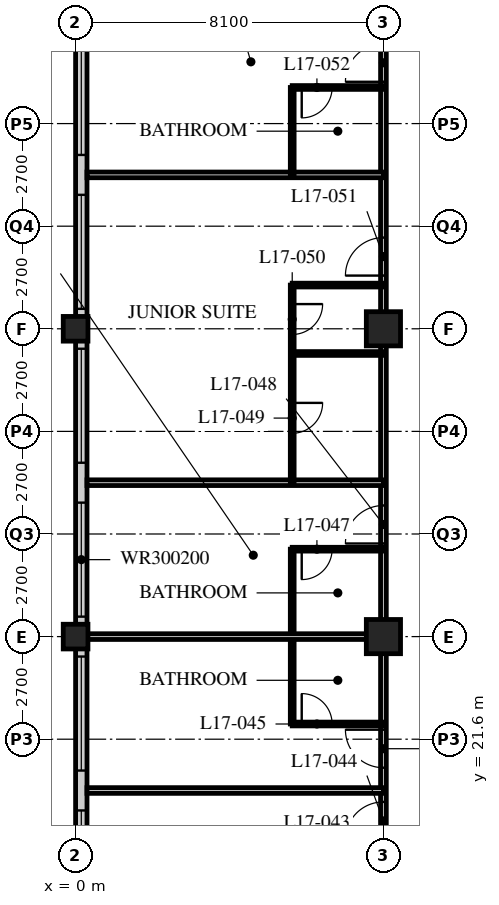
"""IFC4 building model, lengths in metres.
Left out: names, types, materials, properties, quantities, classifications, styles, units other than length and angle.
Written with IfcOpenShell. Run it as: python <this file> out.ifc"""

import sys

from ifc_helpers import new_model, si_unit, direction, frame, frame_2d, origin, origin_2d, place, context, subcontext, project, spatial, rectangle, hollow_rectangle, extrude, element, fill, save


model = new_model("IFC4")
c1 = context("Model", 3, precision=1e-05, world=origin(), true_north=direction((0.0, 1.0)))
c2 = subcontext(c1, "Body", "Model", "MODEL_VIEW")
j1 = project(units=[si_unit("LENGTHUNIT", "METRE"), si_unit("PLANEANGLEUNIT", "RADIAN")], contexts=[c1])
p1 = place(None, origin())
s1 = spatial("IfcSite", under=j1, at=p1, CompositionType="ELEMENT")
p2 = place(p1, origin())
s2 = spatial("IfcBuilding", under=s1, at=p2, CompositionType="ELEMENT")
p3 = place(p2, frame((0.0, 0.0, 70.4)))
s3 = spatial("IfcBuildingStorey", under=s2, at=p3, CompositionType="ELEMENT", Elevation=70.4)
for number, where, z_axis, x_axis in (
    (1, (0.0, 24.3, 0.0), (0.0, 0.0, 1.0), (1.0, 0.0, 0.0)),
    (2, (0.0, 32.4, 0.0), (0.0, 0.0, 1.0), (1.0, 0.0, 0.0)),
):
    element("IfcColumn", number, at=place(p3, frame(where, z_axis=z_axis, x_axis=x_axis)), inside=s3, PredefinedType="COLUMN", context=c2, shape_type="SweptSolid", body=[
        extrude(hollow_rectangle(XDim=0.65, YDim=0.65, WallThickness=0.05, at=origin_2d()), origin(), (0.0, 0.0, 1.0), 3.4),
    ])
for number, where, z_axis, x_axis in (
    (3, (8.1, 24.3, 0.0), (0.0, 0.0, 1.0), (1.0, 0.0, 0.0)),
    (4, (8.1, 32.4, 0.0), (0.0, 0.0, 1.0), (1.0, 0.0, 0.0)),
):
    element("IfcColumn", number, at=place(p3, frame(where, z_axis=z_axis, x_axis=x_axis)), inside=s3, PredefinedType="COLUMN", context=c2, shape_type="SweptSolid", body=[
        extrude(hollow_rectangle(XDim=0.9, YDim=0.9, WallThickness=0.09, at=origin_2d()), origin(), (0.0, 0.0, 1.0), 3.4),
    ])
p4 = place(p3, frame((0.15, 40.2, 0.0), z_axis=(0.0, 0.0, 1.0), x_axis=(0.0, -1.0, 0.0)))
e5 = element("IfcWall", 5, at=p4, inside=s3, PredefinedType="SOLIDWALL", context=c2, shape_type="SweptSolid", body=[
    extrude(rectangle(XDim=32.1, YDim=0.3, at=frame_2d((16.05, 0.0))), origin(), (0.0, 0.0, 1.0), 3.19),
])
p5 = place(p4, frame((0.225, 0.0, 0.9)))
e6 = element("IfcOpeningElement", 6, at=p5, cuts=e5, PredefinedType="OPENING", context=c2, shape_type="SweptSolid", body=[
    extrude(rectangle(XDim=3.0, YDim=2.0, at=frame_2d((1.5, 1.0))), frame((0.0, 0.16, 0.0), z_axis=(0.0, -1.0, 0.0), x_axis=(1.0, 0.0, 0.0)), (0.0, 0.0, 1.0), 0.32),
])
p6 = place(p4, frame((4.275, 0.0, 0.9)))
e7 = element("IfcOpeningElement", 7, at=p6, cuts=e5, PredefinedType="OPENING", context=c2, shape_type="SweptSolid", body=[
    extrude(rectangle(XDim=3.0, YDim=2.0, at=frame_2d((1.5, 1.0))), frame((0.0, 0.16, 0.0), z_axis=(0.0, -1.0, 0.0), x_axis=(1.0, 0.0, 0.0)), (0.0, 0.0, 1.0), 0.32),
])
p7 = place(p4, frame((8.325, 0.0, 0.9)))
e8 = element("IfcOpeningElement", 8, at=p7, cuts=e5, PredefinedType="OPENING", context=c2, shape_type="SweptSolid", body=[
    extrude(rectangle(XDim=3.0, YDim=2.0, at=frame_2d((1.5, 1.0))), frame((0.0, 0.16, 0.0), z_axis=(0.0, -1.0, 0.0), x_axis=(1.0, 0.0, 0.0)), (0.0, 0.0, 1.0), 0.32),
])
p8 = place(p4, frame((12.375, 0.0, 0.9)))
e9 = element("IfcOpeningElement", 9, at=p8, cuts=e5, PredefinedType="OPENING", context=c2, shape_type="SweptSolid", body=[
    extrude(rectangle(XDim=3.0, YDim=2.0, at=frame_2d((1.5, 1.0))), frame((0.0, 0.16, 0.0), z_axis=(0.0, -1.0, 0.0), x_axis=(1.0, 0.0, 0.0)), (0.0, 0.0, 1.0), 0.32),
])
p9 = place(p4, frame((16.425, 0.0, 0.9)))
e10 = element("IfcOpeningElement", 10, at=p9, cuts=e5, PredefinedType="OPENING", context=c2, shape_type="SweptSolid", body=[
    extrude(rectangle(XDim=3.0, YDim=2.0, at=frame_2d((1.5, 1.0))), frame((0.0, 0.16, 0.0), z_axis=(0.0, -1.0, 0.0), x_axis=(1.0, 0.0, 0.0)), (0.0, 0.0, 1.0), 0.32),
])
p10 = place(p4, frame((20.475, 0.0, 0.9)))
e11 = element("IfcOpeningElement", 11, at=p10, cuts=e5, PredefinedType="OPENING", context=c2, shape_type="SweptSolid", body=[
    extrude(rectangle(XDim=3.0, YDim=2.0, at=frame_2d((1.5, 1.0))), frame((0.0, 0.16, 0.0), z_axis=(0.0, -1.0, 0.0), x_axis=(1.0, 0.0, 0.0)), (0.0, 0.0, 1.0), 0.32),
])
p11 = place(p4, frame((24.525, 0.0, 0.9)))
e12 = element("IfcOpeningElement", 12, at=p11, cuts=e5, PredefinedType="OPENING", context=c2, shape_type="SweptSolid", body=[
    extrude(rectangle(XDim=3.0, YDim=2.0, at=frame_2d((1.5, 1.0))), frame((0.0, 0.16, 0.0), z_axis=(0.0, -1.0, 0.0), x_axis=(1.0, 0.0, 0.0)), (0.0, 0.0, 1.0), 0.32),
])
p12 = place(p4, frame((28.575, 0.0, 0.9)))
e13 = element("IfcOpeningElement", 13, at=p12, cuts=e5, PredefinedType="OPENING", context=c2, shape_type="SweptSolid", body=[
    extrude(rectangle(XDim=3.0, YDim=2.0, at=frame_2d((1.5, 1.0))), frame((0.0, 0.16, 0.0), z_axis=(0.0, -1.0, 0.0), x_axis=(1.0, 0.0, 0.0)), (0.0, 0.0, 1.0), 0.32),
])
p13 = place(p3, frame((8.1, 12.15, 0.0), z_axis=(0.0, 0.0, 1.0), x_axis=(0.0, 1.0, 0.0)))
e14 = element("IfcWall", 14, at=p13, inside=s3, PredefinedType="PARTITIONING", context=c2, shape_type="SweptSolid", body=[
    extrude(rectangle(XDim=30.15, YDim=0.15, at=frame_2d((15.075, 0.0))), origin(), (0.0, 0.0, 1.0), 2.578),
])
p14 = place(p13, frame((0.6, 0.0, 0.0)))
e15 = element("IfcOpeningElement", 15, at=p14, cuts=e14, PredefinedType="OPENING", context=c2, shape_type="SweptSolid", body=[
    extrude(rectangle(XDim=1.0, YDim=2.1, at=frame_2d((0.5, 1.05))), frame((0.0, 0.085, 0.0), z_axis=(0.0, -1.0, 0.0), x_axis=(1.0, 0.0, 0.0)), (0.0, 0.0, 1.0), 0.17),
])
p15 = place(p13, frame((6.8, 0.0, 0.0)))
e16 = element("IfcOpeningElement", 16, at=p15, cuts=e14, PredefinedType="OPENING", context=c2, shape_type="SweptSolid", body=[
    extrude(rectangle(XDim=1.0, YDim=2.1, at=frame_2d((0.5, 1.05))), frame((0.0, 0.085, 0.0), z_axis=(0.0, -1.0, 0.0), x_axis=(1.0, 0.0, 0.0)), (0.0, 0.0, 1.0), 0.17),
])
p16 = place(p13, frame((8.7, 0.0, 0.0)))
e17 = element("IfcOpeningElement", 17, at=p16, cuts=e14, PredefinedType="OPENING", context=c2, shape_type="SweptSolid", body=[
    extrude(rectangle(XDim=1.0, YDim=2.1, at=frame_2d((0.5, 1.05))), frame((0.0, 0.085, 0.0), z_axis=(0.0, -1.0, 0.0), x_axis=(1.0, 0.0, 0.0)), (0.0, 0.0, 1.0), 0.17),
])
p17 = place(p13, frame((14.6, 0.0, 0.0)))
e18 = element("IfcOpeningElement", 18, at=p17, cuts=e14, PredefinedType="OPENING", context=c2, shape_type="SweptSolid", body=[
    extrude(rectangle(XDim=1.0, YDim=2.1, at=frame_2d((0.5, 1.05))), frame((0.0, 0.085, 0.0), z_axis=(0.0, -1.0, 0.0), x_axis=(1.0, 0.0, 0.0)), (0.0, 0.0, 1.0), 0.17),
])
p18 = place(p13, frame((21.65, 0.0, 0.0)))
e19 = element("IfcOpeningElement", 19, at=p18, cuts=e14, PredefinedType="OPENING", context=c2, shape_type="SweptSolid", body=[
    extrude(rectangle(XDim=1.0, YDim=2.1, at=frame_2d((0.5, 1.05))), frame((0.0, 0.085, 0.0), z_axis=(0.0, -1.0, 0.0), x_axis=(1.0, 0.0, 0.0)), (0.0, 0.0, 1.0), 0.17),
])
p19 = place(p13, frame((26.75, 0.0, 0.0)))
e20 = element("IfcOpeningElement", 20, at=p19, cuts=e14, PredefinedType="OPENING", context=c2, shape_type="SweptSolid", body=[
    extrude(rectangle(XDim=1.0, YDim=2.1, at=frame_2d((0.5, 1.05))), frame((0.0, 0.085, 0.0), z_axis=(0.0, -1.0, 0.0), x_axis=(1.0, 0.0, 0.0)), (0.0, 0.0, 1.0), 0.17),
])
p20 = place(p3, frame((8.1, 20.25, 0.0), z_axis=(0.0, 0.0, 1.0), x_axis=(-1.0, 0.0, 0.0)))
e21 = element("IfcWall", 21, at=p20, inside=s3, PredefinedType="PARTITIONING", context=c2, shape_type="SweptSolid", body=[
    extrude(rectangle(XDim=7.8, YDim=0.15, at=frame_2d((3.9, 0.0))), origin(), (0.0, 0.0, 1.0), 3.19),
])
p21 = place(p3, frame((5.7, 22.0, 0.0), z_axis=(0.0, 0.0, 1.0), x_axis=(0.0, 1.0, 0.0)))
e22 = element("IfcWall", 22, at=p21, inside=s3, PredefinedType="PARTITIONING", context=c2, shape_type="SweptSolid", body=[
    extrude(rectangle(XDim=4.6, YDim=0.1, at=frame_2d((2.3, 0.0))), origin(), (0.0, 0.0, 1.0), 3.19),
])
p22 = place(p3, frame((8.1, 22.0, 0.0), z_axis=(0.0, 0.0, 1.0), x_axis=(-1.0, 0.0, 0.0)))
e23 = element("IfcWall", 23, at=p22, inside=s3, PredefinedType="PARTITIONING", context=c2, shape_type="SweptSolid", body=[
    extrude(rectangle(XDim=2.4, YDim=0.1, at=frame_2d((1.2, 0.0))), origin(), (0.0, 0.0, 1.0), 3.19),
])
p23 = place(p22, frame((1.35, 0.0, 0.0)))
e24 = element("IfcOpeningElement", 24, at=p23, cuts=e23, PredefinedType="OPENING", context=c2, shape_type="SweptSolid", body=[
    extrude(rectangle(XDim=0.8, YDim=2.1, at=frame_2d((0.4, 1.05))), frame((0.0, 0.06, 0.0), z_axis=(0.0, -1.0, 0.0), x_axis=(1.0, 0.0, 0.0)), (0.0, 0.0, 1.0), 0.12),
])
p24 = place(p3, frame((8.1, 24.3, 0.0), z_axis=(0.0, 0.0, 1.0), x_axis=(-1.0, 0.0, 0.0)))
e25 = element("IfcWall", 25, at=p24, inside=s3, PredefinedType="PARTITIONING", context=c2, shape_type="SweptSolid", body=[
    extrude(rectangle(XDim=7.8, YDim=0.15, at=frame_2d((3.9, 0.0))), origin(), (0.0, 0.0, 1.0), 2.578),
])
p25 = place(p3, frame((8.1, 26.6, 0.0), z_axis=(0.0, 0.0, 1.0), x_axis=(-1.0, 0.0, 0.0)))
e26 = element("IfcWall", 26, at=p25, inside=s3, PredefinedType="PARTITIONING", context=c2, shape_type="SweptSolid", body=[
    extrude(rectangle(XDim=2.4, YDim=0.1, at=frame_2d((1.2, 0.0))), origin(), (0.0, 0.0, 1.0), 3.19),
])
p26 = place(p25, frame((1.35, 0.0, 0.0)))
e27 = element("IfcOpeningElement", 27, at=p26, cuts=e26, PredefinedType="OPENING", context=c2, shape_type="SweptSolid", body=[
    extrude(rectangle(XDim=0.8, YDim=2.1, at=frame_2d((0.4, 1.05))), frame((0.0, 0.06, 0.0), z_axis=(0.0, -1.0, 0.0), x_axis=(1.0, 0.0, 0.0)), (0.0, 0.0, 1.0), 0.12),
])
p27 = place(p3, frame((8.1, 28.35, 0.0), z_axis=(0.0, 0.0, 1.0), x_axis=(-1.0, 0.0, 0.0)))
e28 = element("IfcWall", 28, at=p27, inside=s3, PredefinedType="PARTITIONING", context=c2, shape_type="SweptSolid", body=[
    extrude(rectangle(XDim=7.8, YDim=0.15, at=frame_2d((3.9, 0.0))), origin(), (0.0, 0.0, 1.0), 3.19),
])
p28 = place(p3, frame((5.7, 28.35, 0.0), z_axis=(0.0, 0.0, 1.0), x_axis=(0.0, 1.0, 0.0)))
e29 = element("IfcWall", 29, at=p28, inside=s3, PredefinedType="PARTITIONING", context=c2, shape_type="SweptSolid", body=[
    extrude(rectangle(XDim=5.2, YDim=0.1, at=frame_2d((2.6, 0.0))), origin(), (0.0, 0.0, 1.0), 3.19),
])
p29 = place(p28, frame((1.3, 0.0, 0.0)))
e30 = element("IfcOpeningElement", 30, at=p29, cuts=e29, PredefinedType="OPENING", context=c2, shape_type="SweptSolid", body=[
    extrude(rectangle(XDim=0.8, YDim=2.1, at=frame_2d((0.4, 1.05))), frame((0.0, 0.06, 0.0), z_axis=(0.0, -1.0, 0.0), x_axis=(1.0, 0.0, 0.0)), (0.0, 0.0, 1.0), 0.12),
])
p30 = place(p28, frame((3.9, 0.0, 0.0)))
e31 = element("IfcOpeningElement", 31, at=p30, cuts=e29, PredefinedType="OPENING", context=c2, shape_type="SweptSolid", body=[
    extrude(rectangle(XDim=0.8, YDim=2.1, at=frame_2d((0.4, 1.05))), frame((0.0, 0.06, 0.0), z_axis=(0.0, -1.0, 0.0), x_axis=(1.0, 0.0, 0.0)), (0.0, 0.0, 1.0), 0.12),
])
for number, where, z_axis, x_axis in (
    (32, (8.1, 31.75, 0.0), (0.0, 0.0, 1.0), (-1.0, 0.0, 0.0)),
    (33, (8.1, 33.55, 0.0), (0.0, 0.0, 1.0), (-1.0, 0.0, 0.0)),
):
    element("IfcWall", number, at=place(p3, frame(where, z_axis=z_axis, x_axis=x_axis)), inside=s3, PredefinedType="PARTITIONING", context=c2, shape_type="SweptSolid", body=[
        extrude(rectangle(XDim=2.4, YDim=0.1, at=frame_2d((1.2, 0.0))), origin(), (0.0, 0.0, 1.0), 3.19),
    ])
p31 = place(p3, frame((8.1, 36.45, 0.0), z_axis=(0.0, 0.0, 1.0), x_axis=(-1.0, 0.0, 0.0)))
e34 = element("IfcWall", 34, at=p31, inside=s3, PredefinedType="PARTITIONING", context=c2, shape_type="SweptSolid", body=[
    extrude(rectangle(XDim=7.8, YDim=0.15, at=frame_2d((3.9, 0.0))), origin(), (0.0, 0.0, 1.0), 3.19),
])
p32 = place(p3, frame((5.7, 36.45, 0.0), z_axis=(0.0, 0.0, 1.0), x_axis=(0.0, 1.0, 0.0)))
e35 = element("IfcWall", 35, at=p32, inside=s3, PredefinedType="PARTITIONING", context=c2, shape_type="SweptSolid", body=[
    extrude(rectangle(XDim=2.3, YDim=0.1, at=frame_2d((1.15, 0.0))), origin(), (0.0, 0.0, 1.0), 3.19),
])
p33 = place(p3, frame((8.1, 38.75, 0.0), z_axis=(0.0, 0.0, 1.0), x_axis=(-1.0, 0.0, 0.0)))
e36 = element("IfcWall", 36, at=p33, inside=s3, PredefinedType="PARTITIONING", context=c2, shape_type="SweptSolid", body=[
    extrude(rectangle(XDim=2.4, YDim=0.1, at=frame_2d((1.2, 0.0))), origin(), (0.0, 0.0, 1.0), 3.19),
])
p34 = place(p33, frame((1.35, 0.0, 0.0)))
e37 = element("IfcOpeningElement", 37, at=p34, cuts=e36, PredefinedType="OPENING", context=c2, shape_type="SweptSolid", body=[
    extrude(rectangle(XDim=0.8, YDim=2.1, at=frame_2d((0.4, 1.05))), frame((0.0, 0.06, 0.0), z_axis=(0.0, -1.0, 0.0), x_axis=(1.0, 0.0, 0.0)), (0.0, 0.0, 1.0), 0.12),
])
p35 = place(p5, origin())
e38 = element("IfcWindow", 38, at=p35, inside=s3, PartitioningType="SINGLE_PANEL", PredefinedType="WINDOW", context=c2, shape_type="SweptSolid", body=[
    extrude(rectangle(XDim=3.0, YDim=2.0, at=frame_2d((1.5, 1.0))), frame((0.0, 0.03, 0.0), z_axis=(0.0, -1.0, 0.0), x_axis=(1.0, 0.0, 0.0)), (0.0, 0.0, 1.0), 0.06),
])
fill(e6, e38)
p36 = place(p6, origin())
e39 = element("IfcWindow", 39, at=p36, inside=s3, PartitioningType="SINGLE_PANEL", PredefinedType="WINDOW", context=c2, shape_type="SweptSolid", body=[
    extrude(rectangle(XDim=3.0, YDim=2.0, at=frame_2d((1.5, 1.0))), frame((0.0, 0.03, 0.0), z_axis=(0.0, -1.0, 0.0), x_axis=(1.0, 0.0, 0.0)), (0.0, 0.0, 1.0), 0.06),
])
fill(e7, e39)
p37 = place(p7, origin())
e40 = element("IfcWindow", 40, at=p37, inside=s3, PartitioningType="SINGLE_PANEL", PredefinedType="WINDOW", context=c2, shape_type="SweptSolid", body=[
    extrude(rectangle(XDim=3.0, YDim=2.0, at=frame_2d((1.5, 1.0))), frame((0.0, 0.03, 0.0), z_axis=(0.0, -1.0, 0.0), x_axis=(1.0, 0.0, 0.0)), (0.0, 0.0, 1.0), 0.06),
])
fill(e8, e40)
p38 = place(p8, origin())
e41 = element("IfcWindow", 41, at=p38, inside=s3, PartitioningType="SINGLE_PANEL", PredefinedType="WINDOW", context=c2, shape_type="SweptSolid", body=[
    extrude(rectangle(XDim=3.0, YDim=2.0, at=frame_2d((1.5, 1.0))), frame((0.0, 0.03, 0.0), z_axis=(0.0, -1.0, 0.0), x_axis=(1.0, 0.0, 0.0)), (0.0, 0.0, 1.0), 0.06),
])
fill(e9, e41)
p39 = place(p9, origin())
e42 = element("IfcWindow", 42, at=p39, inside=s3, PartitioningType="SINGLE_PANEL", PredefinedType="WINDOW", context=c2, shape_type="SweptSolid", body=[
    extrude(rectangle(XDim=3.0, YDim=2.0, at=frame_2d((1.5, 1.0))), frame((0.0, 0.03, 0.0), z_axis=(0.0, -1.0, 0.0), x_axis=(1.0, 0.0, 0.0)), (0.0, 0.0, 1.0), 0.06),
])
fill(e10, e42)
p40 = place(p10, origin())
e43 = element("IfcWindow", 43, at=p40, inside=s3, PartitioningType="SINGLE_PANEL", PredefinedType="WINDOW", context=c2, shape_type="SweptSolid", body=[
    extrude(rectangle(XDim=3.0, YDim=2.0, at=frame_2d((1.5, 1.0))), frame((0.0, 0.03, 0.0), z_axis=(0.0, -1.0, 0.0), x_axis=(1.0, 0.0, 0.0)), (0.0, 0.0, 1.0), 0.06),
])
fill(e11, e43)
p41 = place(p15, origin())
e44 = element("IfcDoor", 44, at=p41, inside=s3, OperationType="SINGLE_SWING_LEFT", PredefinedType="DOOR", context=c2, shape_type="SweptSolid", body=[
    extrude(rectangle(XDim=1.0, YDim=2.1, at=frame_2d((0.5, 1.05))), frame((0.0, 0.025, 0.0), z_axis=(0.0, -1.0, 0.0), x_axis=(1.0, 0.0, 0.0)), (0.0, 0.0, 1.0), 0.05),
])
fill(e16, e44)
p42 = place(p23, origin())
e45 = element("IfcDoor", 45, at=p42, inside=s3, OperationType="SINGLE_SWING_LEFT", PredefinedType="DOOR", context=c2, shape_type="SweptSolid", body=[
    extrude(rectangle(XDim=0.8, YDim=2.1, at=frame_2d((0.4, 1.05))), frame((0.0, 0.025, 0.0), z_axis=(0.0, -1.0, 0.0), x_axis=(1.0, 0.0, 0.0)), (0.0, 0.0, 1.0), 0.05),
])
fill(e24, e45)
p43 = place(p16, origin())
e46 = element("IfcDoor", 46, at=p43, inside=s3, OperationType="SINGLE_SWING_RIGHT", PredefinedType="DOOR", context=c2, shape_type="SweptSolid", body=[
    extrude(rectangle(XDim=1.0, YDim=2.1, at=frame_2d((0.5, 1.05))), frame((0.0, 0.025, 0.0), z_axis=(0.0, -1.0, 0.0), x_axis=(1.0, 0.0, 0.0)), (0.0, 0.0, 1.0), 0.05),
])
fill(e17, e46)
p44 = place(p26, origin())
e47 = element("IfcDoor", 47, at=p44, inside=s3, OperationType="SINGLE_SWING_RIGHT", PredefinedType="DOOR", context=c2, shape_type="SweptSolid", body=[
    extrude(rectangle(XDim=0.8, YDim=2.1, at=frame_2d((0.4, 1.05))), frame((0.0, 0.025, 0.0), z_axis=(0.0, -1.0, 0.0), x_axis=(1.0, 0.0, 0.0)), (0.0, 0.0, 1.0), 0.05),
])
fill(e27, e47)
p45 = place(p17, origin())
e48 = element("IfcDoor", 48, at=p45, inside=s3, OperationType="SINGLE_SWING_LEFT", PredefinedType="DOOR", context=c2, shape_type="SweptSolid", body=[
    extrude(rectangle(XDim=1.0, YDim=2.1, at=frame_2d((0.5, 1.05))), frame((0.0, 0.025, 0.0), z_axis=(0.0, -1.0, 0.0), x_axis=(1.0, 0.0, 0.0)), (0.0, 0.0, 1.0), 0.05),
])
fill(e18, e48)
p46 = place(p29, origin())
e49 = element("IfcDoor", 49, at=p46, inside=s3, OperationType="SINGLE_SWING_LEFT", PredefinedType="DOOR", context=c2, shape_type="SweptSolid", body=[
    extrude(rectangle(XDim=0.8, YDim=2.1, at=frame_2d((0.4, 1.05))), frame((0.0, 0.025, 0.0), z_axis=(0.0, -1.0, 0.0), x_axis=(1.0, 0.0, 0.0)), (0.0, 0.0, 1.0), 0.05),
])
fill(e30, e49)
p47 = place(p30, origin())
e50 = element("IfcDoor", 50, at=p47, inside=s3, OperationType="SINGLE_SWING_LEFT", PredefinedType="DOOR", context=c2, shape_type="SweptSolid", body=[
    extrude(rectangle(XDim=0.8, YDim=2.1, at=frame_2d((0.4, 1.05))), frame((0.0, 0.025, 0.0), z_axis=(0.0, -1.0, 0.0), x_axis=(1.0, 0.0, 0.0)), (0.0, 0.0, 1.0), 0.05),
])
fill(e31, e50)
p48 = place(p18, origin())
e51 = element("IfcDoor", 51, at=p48, inside=s3, OperationType="SINGLE_SWING_LEFT", PredefinedType="DOOR", context=c2, shape_type="SweptSolid", body=[
    extrude(rectangle(XDim=1.0, YDim=2.1, at=frame_2d((0.5, 1.05))), frame((0.0, 0.025, 0.0), z_axis=(0.0, -1.0, 0.0), x_axis=(1.0, 0.0, 0.0)), (0.0, 0.0, 1.0), 0.05),
])
fill(e19, e51)
p49 = place(p34, origin())
e52 = element("IfcDoor", 52, at=p49, inside=s3, OperationType="SINGLE_SWING_RIGHT", PredefinedType="DOOR", context=c2, shape_type="SweptSolid", body=[
    extrude(rectangle(XDim=0.8, YDim=2.1, at=frame_2d((0.4, 1.05))), frame((0.0, 0.025, 0.0), z_axis=(0.0, -1.0, 0.0), x_axis=(1.0, 0.0, 0.0)), (0.0, 0.0, 1.0), 0.05),
])
fill(e37, e52)
p50 = place(p19, origin())
e53 = element("IfcDoor", 53, at=p50, inside=s3, OperationType="SINGLE_SWING_LEFT", PredefinedType="DOOR", context=c2, shape_type="SweptSolid", body=[
    extrude(rectangle(XDim=1.0, YDim=2.1, at=frame_2d((0.5, 1.05))), frame((0.0, 0.025, 0.0), z_axis=(0.0, -1.0, 0.0), x_axis=(1.0, 0.0, 0.0)), (0.0, 0.0, 1.0), 0.05),
])
fill(e20, e53)
save(model, sys.argv[1])
